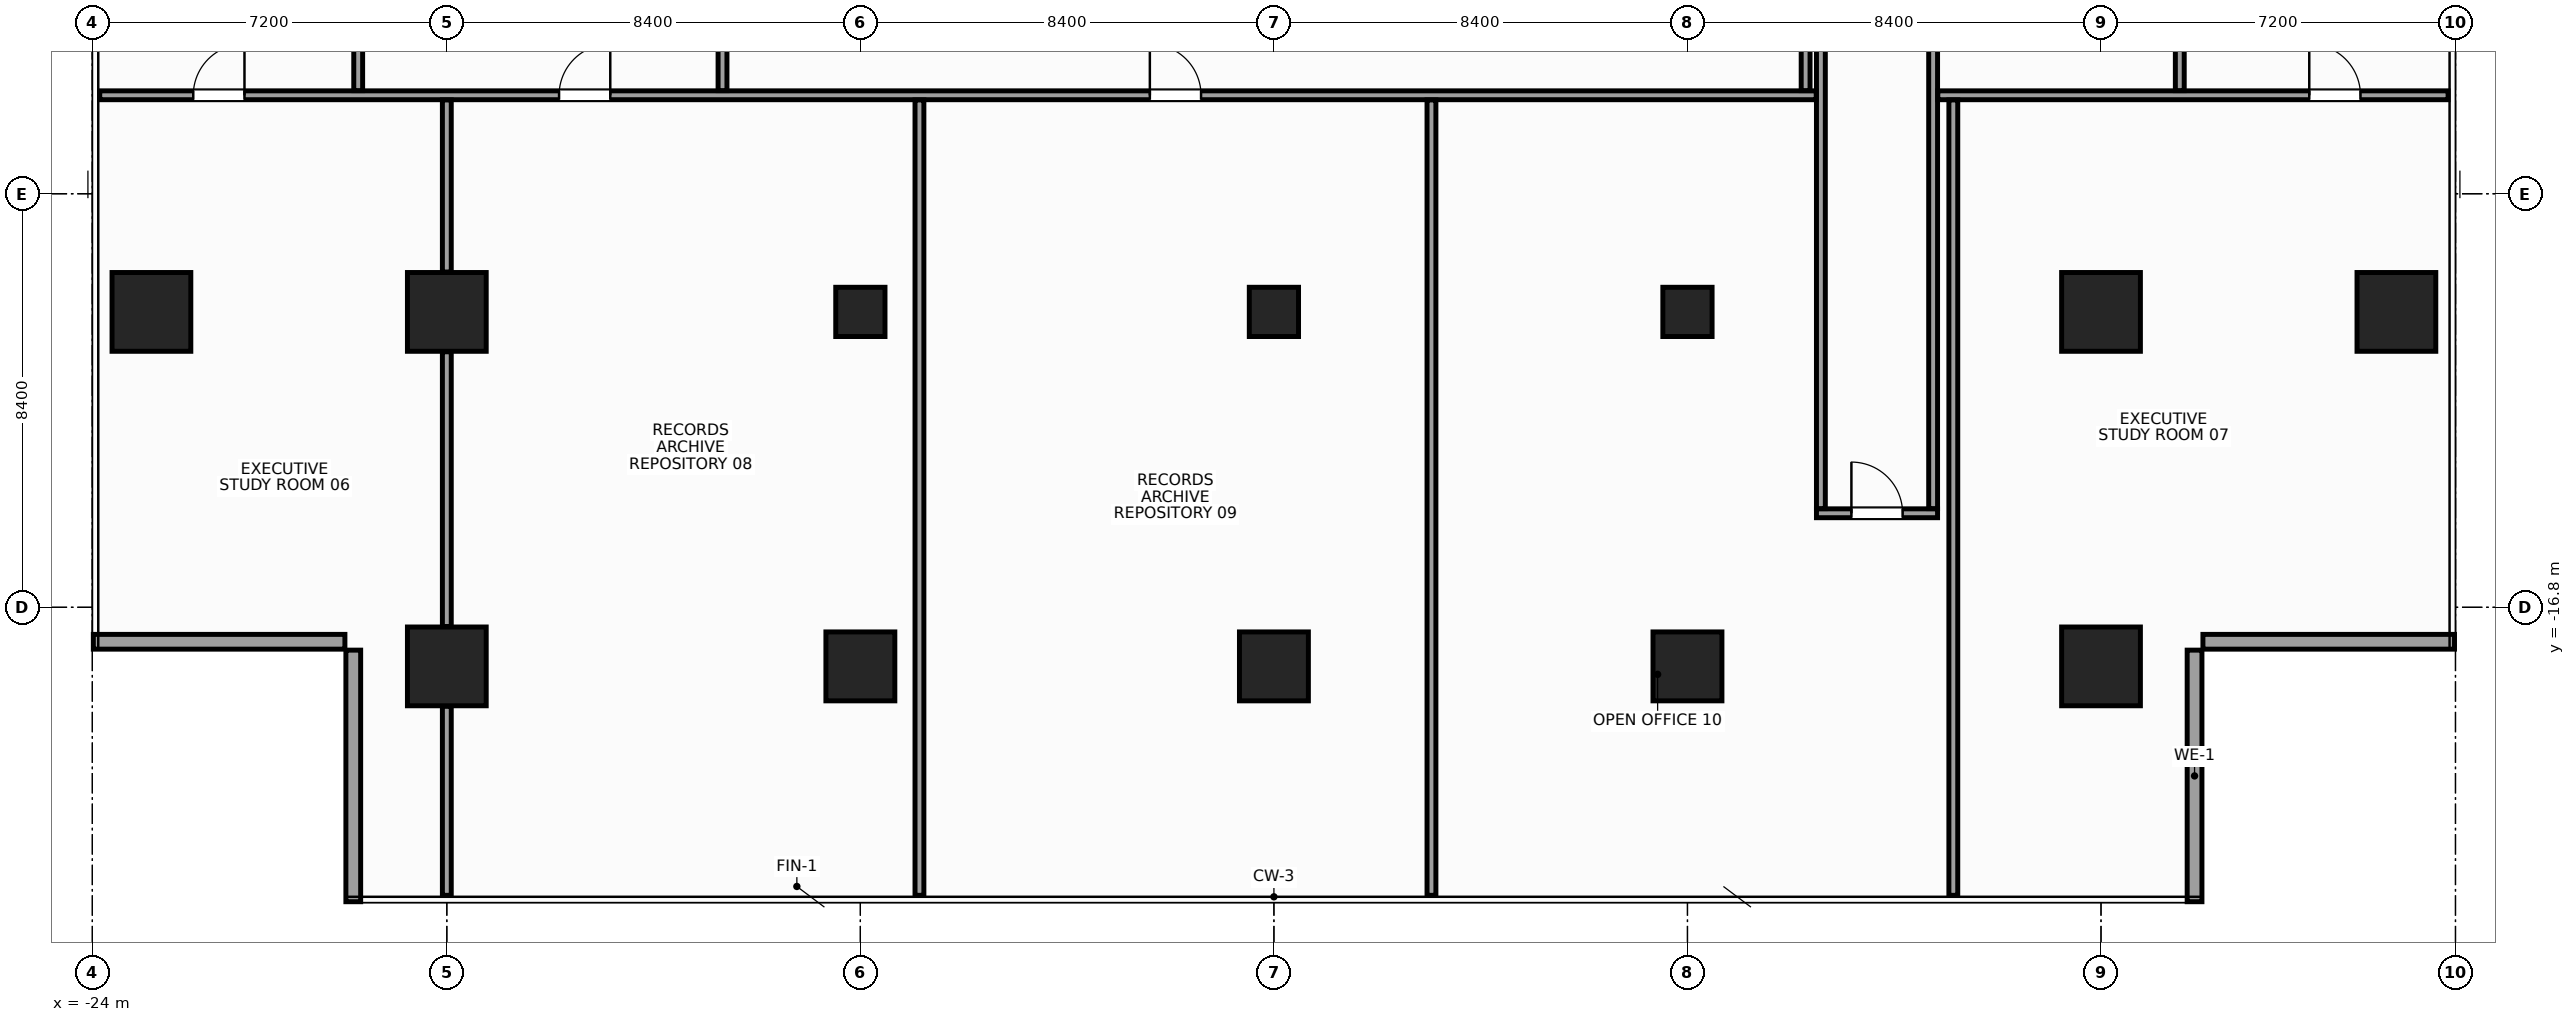
"""IFC4 building model, lengths in metres.
Left out: names, types, materials, properties, quantities, classifications, styles, units other than length and angle.
Written with IfcOpenShell. Run it as: python <this file> out.ifc"""

import sys

from ifc_helpers import new_model, si_unit, direction, frame, frame_2d, origin, origin_2d, place, context, subcontext, project, spatial, rectangle, hollow_rectangle, extrude, source, transform, mapped, element, fill, save


model = new_model("IFC4")
c1 = context("Model", 3, precision=1e-05, world=origin(), true_north=direction((0.0, 1.0)))
c2 = subcontext(c1, "Body", "Model", "MODEL_VIEW")
j1 = project(units=[si_unit("LENGTHUNIT", "METRE"), si_unit("PLANEANGLEUNIT", "RADIAN")], contexts=[c1])
p1 = place(None, origin())
s1 = spatial("IfcSite", under=j1, at=p1, CompositionType="ELEMENT")
p2 = place(p1, origin())
s2 = spatial("IfcBuilding", under=s1, at=p2, CompositionType="ELEMENT")
p3 = place(p2, frame((0.0, 0.0, 174.8)))
s3 = spatial("IfcBuildingStorey", under=s2, at=p3, CompositionType="ELEMENT", Elevation=174.8)
m1 = source(origin(), c2, "Body", "SweptSolid", [
    extrude(rectangle(XDim=1.6, YDim=1.6, at=origin_2d()), origin(), (0.0, 0.0, 1.0), 3.6),
])
for number, where, z_axis, x_axis in (
    (1, (-16.8, -18.0, 0.0), (0.0, 0.0, 1.0), (1.0, 0.0, 0.0)),
    (2, (-16.8, -10.8, 0.0), (0.0, 0.0, 1.0), (1.0, 0.0, 0.0)),
    (3, (16.8, -18.0, 0.0), (0.0, 0.0, 1.0), (1.0, 0.0, 0.0)),
    (4, (16.8, -10.8, 0.0), (0.0, 0.0, 1.0), (1.0, 0.0, 0.0)),
    (5, (-22.8, -10.8, 0.0), (0.0, 0.0, 1.0), (1.0, 0.0, 0.0)),
    (6, (22.8, -10.8, 0.0), (0.0, 0.0, 1.0), (1.0, 0.0, 0.0)),
):
    element("IfcColumn", number, at=place(p3, frame(where, z_axis=z_axis, x_axis=x_axis)), inside=s3, PredefinedType="COLUMN", context=c2, shape_type="MappedRepresentation", body=[
        mapped(m1, transform((0.0, 0.0, 0.0), x_axis=(1.0, 0.0, 0.0), y_axis=(0.0, 1.0, 0.0), z_axis=(0.0, 0.0, 1.0), scale=1.0)),
    ])
m2 = source(origin(), c2, "Body", "SweptSolid", [
    extrude(rectangle(XDim=1.4, YDim=1.4, at=origin_2d()), origin(), (0.0, 0.0, 1.0), 3.6),
])
p4 = place(p3, frame((-8.4, -18.0, 0.0), z_axis=(0.0, 0.0, 1.0), x_axis=(1.0, 0.0, 0.0)))
e7 = element("IfcColumn", 7, at=p4, inside=s3, PredefinedType="COLUMN", context=c2, shape_type="MappedRepresentation", body=[
    mapped(m2, transform((0.0, 0.0, 0.0), x_axis=(1.0, 0.0, 0.0), y_axis=(0.0, 1.0, 0.0), z_axis=(0.0, 0.0, 1.0), scale=1.0)),
])
m3 = source(origin(), c2, "Body", "SweptSolid", [
    extrude(hollow_rectangle(XDim=1.0, YDim=1.0, WallThickness=0.045, at=origin_2d()), origin(), (0.0, 0.0, 1.0), 3.6),
])
p5 = place(p3, frame((-8.4, -10.8, 0.0), z_axis=(0.0, 0.0, 1.0), x_axis=(1.0, 0.0, 0.0)))
e8 = element("IfcColumn", 8, at=p5, inside=s3, PredefinedType="COLUMN", context=c2, shape_type="MappedRepresentation", body=[
    mapped(m3, transform((0.0, 0.0, 0.0), x_axis=(1.0, 0.0, 0.0), y_axis=(0.0, 1.0, 0.0), z_axis=(0.0, 0.0, 1.0), scale=1.0)),
])
p6 = place(p3, frame((8.4, -18.0, 0.0), z_axis=(0.0, 0.0, 1.0), x_axis=(1.0, 0.0, 0.0)))
e9 = element("IfcColumn", 9, at=p6, inside=s3, PredefinedType="COLUMN", context=c2, shape_type="MappedRepresentation", body=[
    mapped(m2, transform((0.0, 0.0, 0.0), x_axis=(1.0, 0.0, 0.0), y_axis=(0.0, 1.0, 0.0), z_axis=(0.0, 0.0, 1.0), scale=1.0)),
])
p7 = place(p3, frame((8.4, -10.8, 0.0), z_axis=(0.0, 0.0, 1.0), x_axis=(1.0, 0.0, 0.0)))
e10 = element("IfcColumn", 10, at=p7, inside=s3, PredefinedType="COLUMN", context=c2, shape_type="MappedRepresentation", body=[
    mapped(m3, transform((0.0, 0.0, 0.0), x_axis=(1.0, 0.0, 0.0), y_axis=(0.0, 1.0, 0.0), z_axis=(0.0, 0.0, 1.0), scale=1.0)),
])
p8 = place(p3, frame((0.0, -18.0, 0.0), z_axis=(0.0, 0.0, 1.0), x_axis=(1.0, 0.0, 0.0)))
e11 = element("IfcColumn", 11, at=p8, inside=s3, PredefinedType="COLUMN", context=c2, shape_type="MappedRepresentation", body=[
    mapped(m2, transform((0.0, 0.0, 0.0), x_axis=(1.0, 0.0, 0.0), y_axis=(0.0, 1.0, 0.0), z_axis=(0.0, 0.0, 1.0), scale=1.0)),
])
m4 = source(origin(), c2, "Body", "SweptSolid", [
    extrude(rectangle(XDim=1.0, YDim=1.0, at=origin_2d()), origin(), (0.0, 0.0, 1.0), 3.6),
])
p9 = place(p3, frame((0.0, -10.8, 0.0), z_axis=(0.0, 0.0, 1.0), x_axis=(1.0, 0.0, 0.0)))
e12 = element("IfcColumn", 12, at=p9, inside=s3, PredefinedType="COLUMN", context=c2, shape_type="MappedRepresentation", body=[
    mapped(m4, transform((0.0, 0.0, 0.0), x_axis=(1.0, 0.0, 0.0), y_axis=(0.0, 1.0, 0.0), z_axis=(0.0, 0.0, 1.0), scale=1.0)),
])
m5 = source(origin(), c2, "Body", "SweptSolid", [
    extrude(rectangle(XDim=5.11, YDim=0.3, at=frame_2d((2.555, 0.0))), origin(), (0.0, 0.0, 1.0), 2.76),
])
p10 = place(p3, frame((18.7, -22.78, 0.0), z_axis=(0.0, 0.0, 1.0), x_axis=(0.0, 1.0, 0.0)))
e13 = element("IfcWall", 13, at=p10, inside=s3, PredefinedType="STANDARD", context=c2, shape_type="MappedRepresentation", body=[
    mapped(m5, transform((0.0, 0.0, 0.0), x_axis=(1.0, 0.0, 0.0), y_axis=(0.0, 1.0, 0.0), z_axis=(0.0, 0.0, 1.0), scale=1.0)),
])
m6 = source(origin(), c2, "Body", "SweptSolid", [
    extrude(rectangle(XDim=5.11, YDim=0.3, at=frame_2d((2.555, 0.0))), origin(), (0.0, 0.0, 1.0), 2.76),
])
for number, where, z_axis, x_axis in (
    (14, (18.87, -17.5, 0.0), (0.0, 0.0, 1.0), (1.0, 0.0, 0.0)),
    (15, (-23.98, -17.5, 0.0), (0.0, 0.0, 1.0), (1.0, 0.0, 0.0)),
):
    element("IfcWall", number, at=place(p3, frame(where, z_axis=z_axis, x_axis=x_axis)), inside=s3, PredefinedType="STANDARD", context=c2, shape_type="MappedRepresentation", body=[
        mapped(m6, transform((0.0, 0.0, 0.0), x_axis=(1.0, 0.0, 0.0), y_axis=(0.0, 1.0, 0.0), z_axis=(0.0, 0.0, 1.0), scale=1.0)),
    ])
p11 = place(p3, frame((-18.7, -17.67, 0.0), z_axis=(0.0, 0.0, 1.0), x_axis=(0.0, -1.0, 0.0)))
e16 = element("IfcWall", 16, at=p11, inside=s3, PredefinedType="STANDARD", context=c2, shape_type="MappedRepresentation", body=[
    mapped(m5, transform((0.0, 0.0, 0.0), x_axis=(1.0, 0.0, 0.0), y_axis=(0.0, 1.0, 0.0), z_axis=(0.0, 0.0, 1.0), scale=1.0)),
])
m7 = source(origin(), c2, "Body", "SweptSolid", [
    extrude(rectangle(XDim=2.46, YDim=0.18, at=frame_2d((1.23, 0.0))), origin(), (0.0, 0.0, 1.0), 3.38),
])
p12 = place(p3, frame((11.02, -14.89, 0.0), z_axis=(0.0, 0.0, 1.0), x_axis=(1.0, 0.0, 0.0)))
e17 = element("IfcWall", 17, at=p12, inside=s3, PredefinedType="PARTITIONING", context=c2, shape_type="MappedRepresentation", body=[
    mapped(m7, transform((0.0, 0.0, 0.0), x_axis=(1.0, 0.0, 0.0), y_axis=(0.0, 1.0, 0.0), z_axis=(0.0, 0.0, 1.0), scale=1.0)),
])
p13 = place(p12, frame((0.71, 0.0, 0.0)))
e18 = element("IfcOpeningElement", 18, at=p13, cuts=e17, PredefinedType="OPENING", context=c2, shape_type="SweptSolid", body=[
    extrude(rectangle(XDim=1.04, YDim=2.2, at=frame_2d((0.52, 1.1))), frame((0.0, 0.102, 0.0), z_axis=(0.0, -1.0, 0.0), x_axis=(1.0, 0.0, 0.0)), (0.0, 0.0, 1.0), 0.204),
])
m8 = source(origin(), c2, "Body", "SweptSolid", [
    extrude(rectangle(XDim=22.595, YDim=0.18, at=frame_2d((11.297, 0.0))), origin(), (0.0, 0.0, 1.0), 2.665),
])
for number, where, z_axis, x_axis in (
    (19, (11.11, -14.795, 0.0), (0.0, 0.0, 1.0), (0.0, 1.0, 0.0)),
    (20, (13.39, -14.795, 0.0), (0.0, 0.0, 1.0), (0.0, 1.0, 0.0)),
):
    element("IfcWall", number, at=place(p3, frame(where, z_axis=z_axis, x_axis=x_axis)), inside=s3, PredefinedType="PARTITIONING", context=c2, shape_type="MappedRepresentation", body=[
        mapped(m8, transform((0.0, 0.0, 0.0), x_axis=(1.0, 0.0, 0.0), y_axis=(0.0, 1.0, 0.0), z_axis=(0.0, 0.0, 1.0), scale=1.0)),
    ])
m9 = source(origin(), c2, "Body", "SweptSolid", [
    extrude(rectangle(XDim=34.865, YDim=0.18, at=frame_2d((17.433, 0.0))), origin(), (0.0, 0.0, 1.0), 2.765),
])
p14 = place(p3, frame((-23.85, -6.4, 0.0), z_axis=(0.0, 0.0, 1.0), x_axis=(1.0, 0.0, 0.0)))
e21 = element("IfcWall", 21, at=p14, inside=s3, PredefinedType="PARTITIONING", context=c2, shape_type="MappedRepresentation", body=[
    mapped(m9, transform((0.0, 0.0, 0.0), x_axis=(1.0, 0.0, 0.0), y_axis=(0.0, 1.0, 0.0), z_axis=(0.0, 0.0, 1.0), scale=1.0)),
])
p15 = place(p14, frame((1.9, 0.0, 0.0)))
e22 = element("IfcOpeningElement", 22, at=p15, cuts=e21, PredefinedType="OPENING", context=c2, shape_type="SweptSolid", body=[
    extrude(rectangle(XDim=1.04, YDim=2.2, at=frame_2d((0.52, 1.1))), frame((0.0, 0.102, 0.0), z_axis=(0.0, -1.0, 0.0), x_axis=(1.0, 0.0, 0.0)), (0.0, 0.0, 1.0), 0.204),
])
p16 = place(p14, frame((9.33, 0.0, 0.0)))
e23 = element("IfcOpeningElement", 23, at=p16, cuts=e21, PredefinedType="OPENING", context=c2, shape_type="SweptSolid", body=[
    extrude(rectangle(XDim=1.04, YDim=2.2, at=frame_2d((0.52, 1.1))), frame((0.0, 0.102, 0.0), z_axis=(0.0, -1.0, 0.0), x_axis=(1.0, 0.0, 0.0)), (0.0, 0.0, 1.0), 0.204),
])
p17 = place(p14, frame((21.33, 0.0, 0.0)))
e24 = element("IfcOpeningElement", 24, at=p17, cuts=e21, PredefinedType="OPENING", context=c2, shape_type="SweptSolid", body=[
    extrude(rectangle(XDim=1.04, YDim=2.2, at=frame_2d((0.52, 1.1))), frame((0.0, 0.102, 0.0), z_axis=(0.0, -1.0, 0.0), x_axis=(1.0, 0.0, 0.0)), (0.0, 0.0, 1.0), 0.204),
])
m10 = source(origin(), c2, "Body", "SweptSolid", [
    extrude(rectangle(XDim=10.365, YDim=0.18, at=frame_2d((5.183, 0.0))), origin(), (0.0, 0.0, 1.0), 2.765),
])
p18 = place(p3, frame((13.485, -6.4, 0.0), z_axis=(0.0, 0.0, 1.0), x_axis=(1.0, 0.0, 0.0)))
e25 = element("IfcWall", 25, at=p18, inside=s3, PredefinedType="PARTITIONING", context=c2, shape_type="MappedRepresentation", body=[
    mapped(m10, transform((0.0, 0.0, 0.0), x_axis=(1.0, 0.0, 0.0), y_axis=(0.0, 1.0, 0.0), z_axis=(0.0, 0.0, 1.0), scale=1.0)),
])
p19 = place(p18, frame((7.545, 0.0, 0.0)))
e26 = element("IfcOpeningElement", 26, at=p19, cuts=e25, PredefinedType="OPENING", context=c2, shape_type="SweptSolid", body=[
    extrude(rectangle(XDim=1.04, YDim=2.2, at=frame_2d((0.52, 1.1))), frame((0.0, 0.102, 0.0), z_axis=(0.0, -1.0, 0.0), x_axis=(1.0, 0.0, 0.0)), (0.0, 0.0, 1.0), 0.204),
])
m11 = source(origin(), c2, "Body", "SweptSolid", [
    extrude(rectangle(XDim=13.92, YDim=0.18, at=frame_2d((6.96, 0.0))), origin(), (0.0, 0.0, 1.0), 2.915),
])
p20 = place(p3, frame((-18.6, -6.305, 0.0), z_axis=(0.0, 0.0, 1.0), x_axis=(0.0, 1.0, 0.0)))
e27 = element("IfcWall", 27, at=p20, inside=s3, PredefinedType="PARTITIONING", context=c2, shape_type="MappedRepresentation", body=[
    mapped(m11, transform((0.0, 0.0, 0.0), x_axis=(1.0, 0.0, 0.0), y_axis=(0.0, 1.0, 0.0), z_axis=(0.0, 0.0, 1.0), scale=1.0)),
])
m12 = source(origin(), c2, "Body", "SweptSolid", [
    extrude(rectangle(XDim=13.92, YDim=0.18, at=frame_2d((6.96, 0.0))), origin(), (0.0, 0.0, 1.0), 2.665),
])
for number, where, z_axis, x_axis in (
    (28, (-11.2, -6.305, 0.0), (0.0, 0.0, 1.0), (0.0, 1.0, 0.0)),
    (29, (10.8, -6.305, 0.0), (0.0, 0.0, 1.0), (0.0, 1.0, 0.0)),
):
    element("IfcWall", number, at=place(p3, frame(where, z_axis=z_axis, x_axis=x_axis)), inside=s3, PredefinedType="PARTITIONING", context=c2, shape_type="MappedRepresentation", body=[
        mapped(m12, transform((0.0, 0.0, 0.0), x_axis=(1.0, 0.0, 0.0), y_axis=(0.0, 1.0, 0.0), z_axis=(0.0, 0.0, 1.0), scale=1.0)),
    ])
p21 = place(p3, frame((18.4, -6.305, 0.0), z_axis=(0.0, 0.0, 1.0), x_axis=(0.0, 1.0, 0.0)))
e30 = element("IfcWall", 30, at=p21, inside=s3, PredefinedType="PARTITIONING", context=c2, shape_type="MappedRepresentation", body=[
    mapped(m11, transform((0.0, 0.0, 0.0), x_axis=(1.0, 0.0, 0.0), y_axis=(0.0, 1.0, 0.0), z_axis=(0.0, 0.0, 1.0), scale=1.0)),
])
m13 = source(origin(), c2, "Body", "SweptSolid", [
    extrude(rectangle(XDim=3.84, YDim=0.18, at=frame_2d((1.92, 0.0))), origin(), (0.0, 0.0, 1.0), 3.38),
])
p22 = place(p3, frame((-16.8, -22.65, 0.0), z_axis=(0.0, 0.0, 1.0), x_axis=(0.0, 1.0, 0.0)))
e31 = element("IfcWall", 31, at=p22, inside=s3, PredefinedType="PARTITIONING", context=c2, shape_type="MappedRepresentation", body=[
    mapped(m13, transform((0.0, 0.0, 0.0), x_axis=(1.0, 0.0, 0.0), y_axis=(0.0, 1.0, 0.0), z_axis=(0.0, 0.0, 1.0), scale=1.0)),
])
m14 = source(origin(), c2, "Body", "SweptSolid", [
    extrude(rectangle(XDim=5.58, YDim=0.18, at=frame_2d((2.79, 0.0))), origin(), (0.0, 0.0, 1.0), 2.965),
])
p23 = place(p3, frame((-16.8, -17.19, 0.0), z_axis=(0.0, 0.0, 1.0), x_axis=(0.0, 1.0, 0.0)))
e32 = element("IfcWall", 32, at=p23, inside=s3, PredefinedType="PARTITIONING", context=c2, shape_type="MappedRepresentation", body=[
    mapped(m14, transform((0.0, 0.0, 0.0), x_axis=(1.0, 0.0, 0.0), y_axis=(0.0, 1.0, 0.0), z_axis=(0.0, 0.0, 1.0), scale=1.0)),
])
m15 = source(origin(), c2, "Body", "SweptSolid", [
    extrude(rectangle(XDim=3.495, YDim=0.18, at=frame_2d((1.748, 0.0))), origin(), (0.0, 0.0, 1.0), 2.765),
])
p24 = place(p3, frame((-16.8, -9.99, 0.0), z_axis=(0.0, 0.0, 1.0), x_axis=(0.0, 1.0, 0.0)))
e33 = element("IfcWall", 33, at=p24, inside=s3, PredefinedType="PARTITIONING", context=c2, shape_type="MappedRepresentation", body=[
    mapped(m15, transform((0.0, 0.0, 0.0), x_axis=(1.0, 0.0, 0.0), y_axis=(0.0, 1.0, 0.0), z_axis=(0.0, 0.0, 1.0), scale=1.0)),
])
m16 = source(origin(), c2, "Body", "SweptSolid", [
    extrude(rectangle(XDim=16.155, YDim=0.18, at=frame_2d((8.077, 0.0))), origin(), (0.0, 0.0, 1.0), 2.915),
])
for number, where, z_axis, x_axis in (
    (34, (-7.2, -22.65, 0.0), (0.0, 0.0, 1.0), (0.0, 1.0, 0.0)),
    (35, (3.2, -22.65, 0.0), (0.0, 0.0, 1.0), (0.0, 1.0, 0.0)),
    (36, (13.8, -22.65, 0.0), (0.0, 0.0, 1.0), (0.0, 1.0, 0.0)),
):
    element("IfcWall", number, at=place(p3, frame(where, z_axis=z_axis, x_axis=x_axis)), inside=s3, PredefinedType="PARTITIONING", context=c2, shape_type="MappedRepresentation", body=[
        mapped(m16, transform((0.0, 0.0, 0.0), x_axis=(1.0, 0.0, 0.0), y_axis=(0.0, 1.0, 0.0), z_axis=(0.0, 0.0, 1.0), scale=1.0)),
    ])
m17 = source(origin(), c2, "Body", "SweptSolid", [
    extrude(rectangle(XDim=1.04, YDim=2.2, at=frame_2d((0.52, 1.1))), frame((0.0, 0.025, 0.0), z_axis=(0.0, -1.0, 0.0), x_axis=(1.0, 0.0, 0.0)), (0.0, 0.0, 1.0), 0.05),
])
p25 = place(p13, origin())
e37 = element("IfcDoor", 37, at=p25, inside=s3, OperationType="SINGLE_SWING_LEFT", PredefinedType="DOOR", context=c2, shape_type="MappedRepresentation", body=[
    mapped(m17, transform((0.0, 0.0, 0.0), x_axis=(1.0, 0.0, 0.0), y_axis=(0.0, 1.0, 0.0), z_axis=(0.0, 0.0, 1.0), scale=1.0)),
])
fill(e18, e37)
p26 = place(p15, origin())
e38 = element("IfcDoor", 38, at=p26, inside=s3, OperationType="SINGLE_SWING_RIGHT", PredefinedType="DOOR", context=c2, shape_type="MappedRepresentation", body=[
    mapped(m17, transform((0.0, 0.0, 0.0), x_axis=(1.0, 0.0, 0.0), y_axis=(0.0, 1.0, 0.0), z_axis=(0.0, 0.0, 1.0), scale=1.0)),
])
fill(e22, e38)
p27 = place(p19, origin())
e39 = element("IfcDoor", 39, at=p27, inside=s3, OperationType="SINGLE_SWING_LEFT", PredefinedType="DOOR", context=c2, shape_type="MappedRepresentation", body=[
    mapped(m17, transform((0.0, 0.0, 0.0), x_axis=(1.0, 0.0, 0.0), y_axis=(0.0, 1.0, 0.0), z_axis=(0.0, 0.0, 1.0), scale=1.0)),
])
fill(e26, e39)
p28 = place(p16, origin())
e40 = element("IfcDoor", 40, at=p28, inside=s3, OperationType="SINGLE_SWING_RIGHT", PredefinedType="DOOR", context=c2, shape_type="MappedRepresentation", body=[
    mapped(m17, transform((0.0, 0.0, 0.0), x_axis=(1.0, 0.0, 0.0), y_axis=(0.0, 1.0, 0.0), z_axis=(0.0, 0.0, 1.0), scale=1.0)),
])
fill(e23, e40)
p29 = place(p17, origin())
e41 = element("IfcDoor", 41, at=p29, inside=s3, OperationType="SINGLE_SWING_LEFT", PredefinedType="DOOR", context=c2, shape_type="MappedRepresentation", body=[
    mapped(m17, transform((0.0, 0.0, 0.0), x_axis=(1.0, 0.0, 0.0), y_axis=(0.0, 1.0, 0.0), z_axis=(0.0, 0.0, 1.0), scale=1.0)),
])
fill(e24, e41)
save(model, sys.argv[1])
